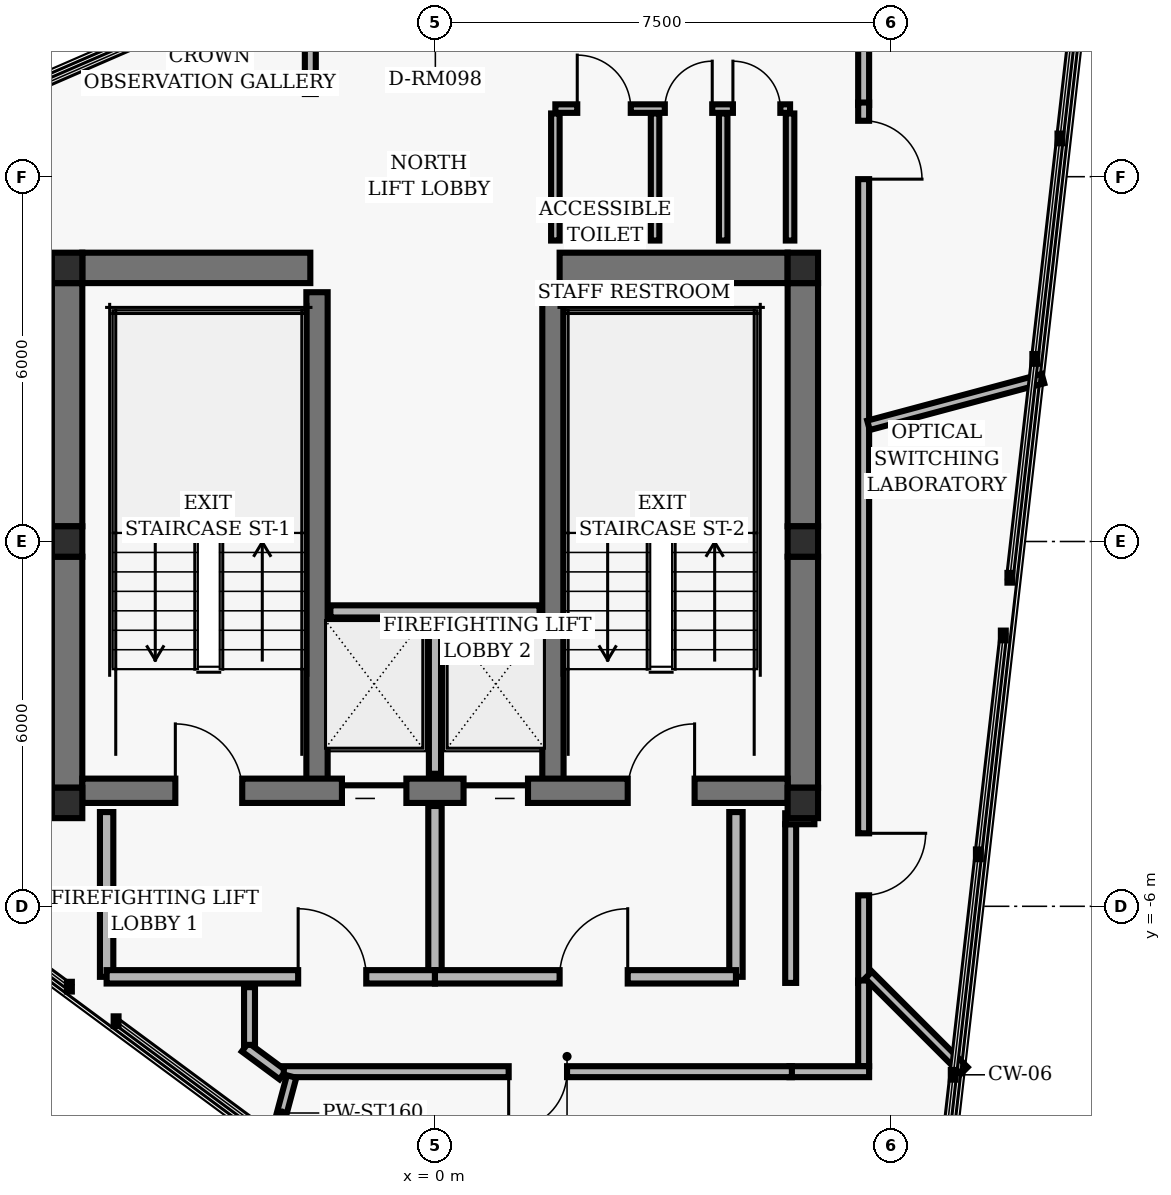
"""IFC4 building model, lengths in metres.
Left out: names, types, materials, properties, quantities, classifications, styles, units other than length and angle.
Written with IfcOpenShell. Run it as: python <this file> out.ifc"""

import sys

from ifc_helpers import new_model, si_unit, direction, frame, frame_2d, origin, origin_2d, place, context, subcontext, project, spatial, rectangle, hollow_rectangle, extrude, element, fill, save


model = new_model("IFC4")
c1 = context("Model", 3, precision=1e-05, world=origin(), true_north=direction((0.0, 1.0)))
c2 = subcontext(c1, "Body", "Model", "MODEL_VIEW")
j1 = project(units=[si_unit("LENGTHUNIT", "METRE"), si_unit("PLANEANGLEUNIT", "RADIAN")], contexts=[c1])
p1 = place(None, origin())
s1 = spatial("IfcSite", under=j1, at=p1, CompositionType="ELEMENT")
p2 = place(p1, origin())
s2 = spatial("IfcBuilding", under=s1, at=p2, CompositionType="ELEMENT")
p3 = place(p2, frame((0.0, 0.0, 243.36)))
s3 = spatial("IfcBuildingStorey", under=s2, at=p3, CompositionType="ELEMENT", Elevation=243.36)
for number, where, z_axis, x_axis in (
    (1, (-6.05, 4.5, 0.0), (0.0, 0.0, 1.0), (1.0, 0.0, 0.0)),
    (2, (6.05, 4.5, 0.0), (0.0, 0.0, 1.0), (1.0, 0.0, 0.0)),
    (3, (-6.05, 0.0, 0.0), (0.0, 0.0, 1.0), (1.0, 0.0, 0.0)),
    (4, (6.05, 0.0, 0.0), (0.0, 0.0, 1.0), (1.0, 0.0, 0.0)),
    (5, (-6.05, -4.3, 0.0), (0.0, 0.0, 1.0), (1.0, 0.0, 0.0)),
    (6, (6.05, -4.3, 0.0), (0.0, 0.0, 1.0), (1.0, 0.0, 0.0)),
):
    element("IfcColumn", number, at=place(p3, frame(where, z_axis=z_axis, x_axis=x_axis)), inside=s3, PredefinedType="COLUMN", context=c2, shape_type="SweptSolid", body=[
        extrude(hollow_rectangle(XDim=0.5, YDim=0.5, WallThickness=0.02, InnerFilletRadius=0.02, OuterFilletRadius=0.04, at=origin_2d()), origin(), (0.0, 0.0, 1.0), 2.88),
    ])
p4 = place(p3, frame((-6.05, 0.25, 0.0), z_axis=(0.0, 0.0, 1.0), x_axis=(0.0, 1.0, 0.0)))
e7 = element("IfcWall", 7, at=p4, inside=s3, PredefinedType="SHEAR", context=c2, shape_type="SweptSolid", body=[
    extrude(rectangle(XDim=4.0, YDim=0.5, at=frame_2d((2.0, 0.0))), origin(), (0.0, 0.0, 1.0), 2.648),
])
p5 = place(p3, frame((-6.05, -4.05, 0.0), z_axis=(0.0, 0.0, 1.0), x_axis=(0.0, 1.0, 0.0)))
e8 = element("IfcWall", 8, at=p5, inside=s3, PredefinedType="SHEAR", context=c2, shape_type="SweptSolid", body=[
    extrude(rectangle(XDim=3.8, YDim=0.5, at=frame_2d((1.9, 0.0))), origin(), (0.0, 0.0, 1.0), 2.648),
])
p6 = place(p3, frame((6.05, 0.25, 0.0), z_axis=(0.0, 0.0, 1.0), x_axis=(0.0, 1.0, 0.0)))
e9 = element("IfcWall", 9, at=p6, inside=s3, PredefinedType="SHEAR", context=c2, shape_type="SweptSolid", body=[
    extrude(rectangle(XDim=4.0, YDim=0.5, at=frame_2d((2.0, 0.0))), origin(), (0.0, 0.0, 1.0), 2.648),
])
p7 = place(p3, frame((6.05, -4.05, 0.0), z_axis=(0.0, 0.0, 1.0), x_axis=(0.0, 1.0, 0.0)))
e10 = element("IfcWall", 10, at=p7, inside=s3, PredefinedType="SHEAR", context=c2, shape_type="SweptSolid", body=[
    extrude(rectangle(XDim=3.8, YDim=0.5, at=frame_2d((1.9, 0.0))), origin(), (0.0, 0.0, 1.0), 2.648),
])
for number, where, z_axis, x_axis in (
    (11, (-1.94, -4.1, 0.0), (0.0, 0.0, 1.0), (0.0, 1.0, 0.0)),
    (12, (1.94, -4.1, 0.0), (0.0, 0.0, 1.0), (0.0, 1.0, 0.0)),
):
    element("IfcWall", number, at=place(p3, frame(where, z_axis=z_axis, x_axis=x_axis)), inside=s3, PredefinedType="SHEAR", context=c2, shape_type="SweptSolid", body=[
        extrude(rectangle(XDim=8.2, YDim=0.35, at=frame_2d((4.1, 0.0))), origin(), (0.0, 0.0, 1.0), 2.648),
    ])
p8 = place(p3, frame((-5.8, -4.1, 0.0), z_axis=(0.0, 0.0, 1.0), x_axis=(1.0, 0.0, 0.0)))
e13 = element("IfcWall", 13, at=p8, inside=s3, PredefinedType="SHEAR", context=c2, shape_type="SweptSolid", body=[
    extrude(rectangle(XDim=11.6, YDim=0.4, at=frame_2d((5.8, 0.0))), origin(), (0.0, 0.0, 1.0), 2.648),
])
p9 = place(p8, frame((1.53, 0.0, 0.0)))
e14 = element("IfcOpeningElement", 14, at=p9, cuts=e13, PredefinedType="OPENING", context=c2, shape_type="SweptSolid", body=[
    extrude(rectangle(XDim=1.1, YDim=2.04, at=frame_2d((0.55, 1.02))), frame((0.0, 0.21, 0.0), z_axis=(0.0, -1.0, 0.0), x_axis=(1.0, 0.0, 0.0)), (0.0, 0.0, 1.0), 0.42),
])
p10 = place(p8, frame((8.97, 0.0, 0.0)))
e15 = element("IfcOpeningElement", 15, at=p10, cuts=e13, PredefinedType="OPENING", context=c2, shape_type="SweptSolid", body=[
    extrude(rectangle(XDim=1.1, YDim=2.04, at=frame_2d((0.55, 1.02))), frame((0.0, 0.21, 0.0), z_axis=(0.0, -1.0, 0.0), x_axis=(1.0, 0.0, 0.0)), (0.0, 0.0, 1.0), 0.42),
])
p11 = place(p8, frame((4.27, 0.0, 0.0)))
e16 = element("IfcOpeningElement", 16, at=p11, cuts=e13, PredefinedType="OPENING", context=c2, shape_type="SweptSolid", body=[
    extrude(rectangle(XDim=1.06, YDim=2.04, at=frame_2d((0.53, 1.02))), frame((0.0, 0.21, 0.0), z_axis=(0.0, -1.0, 0.0), x_axis=(1.0, 0.0, 0.0)), (0.0, 0.0, 1.0), 0.42),
])
p12 = place(p8, frame((6.27, 0.0, 0.0)))
e17 = element("IfcOpeningElement", 17, at=p12, cuts=e13, PredefinedType="OPENING", context=c2, shape_type="SweptSolid", body=[
    extrude(rectangle(XDim=1.06, YDim=2.04, at=frame_2d((0.53, 1.02))), frame((0.0, 0.21, 0.0), z_axis=(0.0, -1.0, 0.0), x_axis=(1.0, 0.0, 0.0)), (0.0, 0.0, 1.0), 0.42),
])
for number, where, z_axis, x_axis in (
    (18, (-5.8, 4.5, 0.0), (0.0, 0.0, 1.0), (1.0, 0.0, 0.0)),
    (19, (2.05, 4.5, 0.0), (0.0, 0.0, 1.0), (1.0, 0.0, 0.0)),
):
    element("IfcWall", number, at=place(p3, frame(where, z_axis=z_axis, x_axis=x_axis)), inside=s3, PredefinedType="SHEAR", context=c2, shape_type="SweptSolid", body=[
        extrude(rectangle(XDim=3.75, YDim=0.5, at=frame_2d((1.875, 0.0))), origin(), (0.0, 0.0, 1.0), 2.648),
    ])
p13 = place(p3, frame((0.0, -3.82, 0.0), z_axis=(0.0, 0.0, 1.0), x_axis=(0.0, 1.0, 0.0)))
e20 = element("IfcWall", 20, at=p13, inside=s3, PredefinedType="PARTITIONING", context=c2, shape_type="SweptSolid", body=[
    extrude(rectangle(XDim=2.67, YDim=0.2, at=frame_2d((1.335, 0.0))), origin(), (0.0, 0.0, 1.0), 2.623),
])
p14 = place(p3, frame((-1.72, -1.15, 0.0), z_axis=(0.0, 0.0, 1.0), x_axis=(1.0, 0.0, 0.0)))
e21 = element("IfcWall", 21, at=p14, inside=s3, PredefinedType="PARTITIONING", context=c2, shape_type="SweptSolid", body=[
    extrude(rectangle(XDim=3.44, YDim=0.2, at=frame_2d((1.72, 0.0))), origin(), (0.0, 0.0, 1.0), 2.623),
])
for number, where, z_axis, x_axis in (
    (22, (-5.4, -7.16, 0.0), (0.0, 0.0, 1.0), (0.0, 1.0, 0.0)),
    (23, (4.95, -7.16, 0.0), (0.0, 0.0, 1.0), (0.0, 1.0, 0.0)),
):
    element("IfcWall", number, at=place(p3, frame(where, z_axis=z_axis, x_axis=x_axis)), inside=s3, PredefinedType="PARTITIONING", context=c2, shape_type="SweptSolid", body=[
        extrude(rectangle(XDim=2.71, YDim=0.22, at=frame_2d((1.355, 0.0))), origin(), (0.0, 0.0, 1.0), 2.623),
    ])
p15 = place(p3, frame((0.0, -7.16, 0.0), z_axis=(0.0, 0.0, 1.0), x_axis=(0.0, 1.0, 0.0)))
e24 = element("IfcWall", 24, at=p15, inside=s3, PredefinedType="PARTITIONING", context=c2, shape_type="SweptSolid", body=[
    extrude(rectangle(XDim=2.81, YDim=0.22, at=frame_2d((1.405, 0.0))), origin(), (0.0, 0.0, 1.0), 2.623),
])
p16 = place(p3, frame((-5.4, -7.16, 0.0), z_axis=(0.0, 0.0, 1.0), x_axis=(1.0, 0.0, 0.0)))
e25 = element("IfcWall", 25, at=p16, inside=s3, PredefinedType="PARTITIONING", context=c2, shape_type="SweptSolid", body=[
    extrude(rectangle(XDim=5.4, YDim=0.22, at=frame_2d((2.7, 0.0))), origin(), (0.0, 0.0, 1.0), 2.623),
])
p17 = place(p16, frame((3.15, 0.0, 0.0)))
e26 = element("IfcOpeningElement", 26, at=p17, cuts=e25, PredefinedType="OPENING", context=c2, shape_type="SweptSolid", body=[
    extrude(rectangle(XDim=1.12, YDim=2.02, at=frame_2d((0.56, 1.01))), frame((0.0, 0.12, 0.0), z_axis=(0.0, -1.0, 0.0), x_axis=(1.0, 0.0, 0.0)), (0.0, 0.0, 1.0), 0.24),
])
p18 = place(p3, frame((0.0, -7.16, 0.0), z_axis=(0.0, 0.0, 1.0), x_axis=(1.0, 0.0, 0.0)))
e27 = element("IfcWall", 27, at=p18, inside=s3, PredefinedType="PARTITIONING", context=c2, shape_type="SweptSolid", body=[
    extrude(rectangle(XDim=4.95, YDim=0.22, at=frame_2d((2.475, 0.0))), origin(), (0.0, 0.0, 1.0), 2.623),
])
p19 = place(p18, frame((2.05, 0.0, 0.0)))
e28 = element("IfcOpeningElement", 28, at=p19, cuts=e27, PredefinedType="OPENING", context=c2, shape_type="SweptSolid", body=[
    extrude(rectangle(XDim=1.12, YDim=2.02, at=frame_2d((0.56, 1.01))), frame((0.0, 0.12, 0.0), z_axis=(0.0, -1.0, 0.0), x_axis=(1.0, 0.0, 0.0)), (0.0, 0.0, 1.0), 0.24),
])
p20 = place(p3, frame((1.98, 4.95, 0.0), z_axis=(0.0, 0.0, 1.0), x_axis=(0.0, 1.0, 0.0)))
e29 = element("IfcWall", 29, at=p20, inside=s3, PredefinedType="PARTITIONING", context=c2, shape_type="SweptSolid", body=[
    extrude(rectangle(XDim=2.09, YDim=0.14, at=frame_2d((1.045, 0.0))), origin(), (0.0, 0.0, 1.0), 2.623),
])
p21 = place(p3, frame((5.84, 4.95, 0.0), z_axis=(0.0, 0.0, 1.0), x_axis=(0.0, 1.0, 0.0)))
e30 = element("IfcWall", 30, at=p21, inside=s3, PredefinedType="PARTITIONING", context=c2, shape_type="SweptSolid", body=[
    extrude(rectangle(XDim=2.09, YDim=0.14, at=frame_2d((1.045, 0.0))), origin(), (0.0, 0.0, 1.0), 2.153),
])
p22 = place(p3, frame((1.98, 7.12, 0.0), z_axis=(0.0, 0.0, 1.0), x_axis=(1.0, 0.0, 0.0)))
e31 = element("IfcWall", 31, at=p22, inside=s3, PredefinedType="PARTITIONING", context=c2, shape_type="SweptSolid", body=[
    extrude(rectangle(XDim=3.86, YDim=0.14, at=frame_2d((1.93, 0.0))), origin(), (0.0, 0.0, 1.0), 2.623),
])
p23 = place(p22, frame((0.36, 0.0, 0.0)))
e32 = element("IfcOpeningElement", 32, at=p23, cuts=e31, PredefinedType="OPENING", context=c2, shape_type="SweptSolid", body=[
    extrude(rectangle(XDim=0.88, YDim=2.02, at=frame_2d((0.44, 1.01))), frame((0.0, 0.08, 0.0), z_axis=(0.0, -1.0, 0.0), x_axis=(1.0, 0.0, 0.0)), (0.0, 0.0, 1.0), 0.16),
])
p24 = place(p22, frame((1.8, 0.0, 0.0)))
e33 = element("IfcOpeningElement", 33, at=p24, cuts=e31, PredefinedType="OPENING", context=c2, shape_type="SweptSolid", body=[
    extrude(rectangle(XDim=0.78, YDim=2.01, at=frame_2d((0.39, 1.005))), frame((0.0, 0.08, 0.0), z_axis=(0.0, -1.0, 0.0), x_axis=(1.0, 0.0, 0.0)), (0.0, 0.0, 1.0), 0.16),
])
p25 = place(p22, frame((2.92, 0.0, 0.0)))
e34 = element("IfcOpeningElement", 34, at=p25, cuts=e31, PredefinedType="OPENING", context=c2, shape_type="SweptSolid", body=[
    extrude(rectangle(XDim=0.78, YDim=2.01, at=frame_2d((0.39, 1.005))), frame((0.0, 0.08, 0.0), z_axis=(0.0, -1.0, 0.0), x_axis=(1.0, 0.0, 0.0)), (0.0, 0.0, 1.0), 0.16),
])
for number, where, z_axis, x_axis in (
    (35, (3.62, 4.95, 0.0), (0.0, 0.0, 1.0), (0.0, 1.0, 0.0)),
    (36, (4.74, 4.95, 0.0), (0.0, 0.0, 1.0), (0.0, 1.0, 0.0)),
):
    element("IfcWall", number, at=place(p3, frame(where, z_axis=z_axis, x_axis=x_axis)), inside=s3, PredefinedType="PARTITIONING", context=c2, shape_type="SweptSolid", body=[
        extrude(rectangle(XDim=2.09, YDim=0.14, at=frame_2d((1.045, 0.0))), origin(), (0.0, 0.0, 1.0), 2.623),
    ])
p26 = place(p3, frame((-2.503, -8.773, 0.0), z_axis=(0.0, 0.0, 1.0), x_axis=(-0.803978362095, 0.594658551845, 0.0)))
e37 = element("IfcWall", 37, at=p26, inside=s3, PredefinedType="PARTITIONING", context=c2, shape_type="SweptSolid", body=[
    extrude(rectangle(XDim=0.77, YDim=0.18, at=frame_2d((0.385, 0.0))), origin(), (0.0, 0.0, 1.0), 2.203),
])
p27 = place(p3, frame((-3.05, -8.279, 0.0), z_axis=(0.0, 0.0, 1.0), x_axis=(0.0, 1.0, 0.0)))
e38 = element("IfcWall", 38, at=p27, inside=s3, PredefinedType="PARTITIONING", context=c2, shape_type="SweptSolid", body=[
    extrude(rectangle(XDim=0.949, YDim=0.18, at=frame_2d((0.475, 0.0))), origin(), (0.0, 0.0, 1.0), 2.623),
])
p28 = place(p3, frame((5.85, -7.26, 0.0), z_axis=(0.0, 0.0, 1.0), x_axis=(0.0, 1.0, 0.0)))
e39 = element("IfcWall", 39, at=p28, inside=s3, PredefinedType="PARTITIONING", context=c2, shape_type="SweptSolid", body=[
    extrude(rectangle(XDim=2.61, YDim=0.18, at=frame_2d((1.305, 0.0))), origin(), (0.0, 0.0, 1.0), 2.153),
])
p29 = place(p3, frame((5.76, -4.56, 0.0), z_axis=(0.0, 0.0, 1.0), x_axis=(1.0, 0.0, 0.0)))
e40 = element("IfcWall", 40, at=p29, inside=s3, PredefinedType="PARTITIONING", context=c2, shape_type="SweptSolid", body=[
    extrude(rectangle(XDim=0.48, YDim=0.18, at=frame_2d((0.24, 0.0))), origin(), (0.0, 0.0, 1.0), 2.623),
])
p30 = place(p3, frame((-2.05, 7.36, 0.0), z_axis=(0.0, 0.0, 1.0), x_axis=(0.0, 1.0, 0.0)))
e41 = element("IfcWall", 41, at=p30, inside=s3, PredefinedType="PARTITIONING", context=c2, shape_type="SweptSolid", body=[
    extrude(rectangle(XDim=0.973, YDim=0.18, at=frame_2d((0.486, 0.0))), origin(), (0.0, 0.0, 1.0), 2.623),
])
p31 = place(p3, frame((7.05, 8.53, 0.0), z_axis=(0.0, 0.0, 1.0), x_axis=(0.0, -1.0, 0.0)))
e42 = element("IfcWall", 42, at=p31, inside=s3, PredefinedType="PARTITIONING", context=c2, shape_type="SweptSolid", body=[
    extrude(rectangle(XDim=1.35, YDim=0.18, at=frame_2d((0.675, 0.0))), origin(), (0.0, 0.0, 1.0), 2.623),
])
p32 = place(p3, frame((7.05, 7.22, 0.0), z_axis=(0.0, 0.0, 1.0), x_axis=(0.0, -1.0, 0.0)))
e43 = element("IfcWall", 43, at=p32, inside=s3, PredefinedType="PARTITIONING", context=c2, shape_type="SweptSolid", body=[
    extrude(rectangle(XDim=14.48, YDim=0.18, at=frame_2d((7.24, 0.0))), origin(), (0.0, 0.0, 1.0), 2.203),
])
p33 = place(p32, frame((12.019, 0.0, 0.0)))
e44 = element("IfcOpeningElement", 44, at=p33, cuts=e43, PredefinedType="OPENING", context=c2, shape_type="SweptSolid", body=[
    extrude(rectangle(XDim=1.02, YDim=2.02, at=frame_2d((0.51, 1.01))), frame((0.0, 0.1, 0.0), z_axis=(0.0, -1.0, 0.0), x_axis=(1.0, 0.0, 0.0)), (0.0, 0.0, 1.0), 0.2),
])
p34 = place(p32, frame((0.3, 0.0, 0.0)))
e45 = element("IfcOpeningElement", 45, at=p34, cuts=e43, PredefinedType="OPENING", context=c2, shape_type="SweptSolid", body=[
    extrude(rectangle(XDim=0.96, YDim=2.02, at=frame_2d((0.48, 1.01))), frame((0.0, 0.1, 0.0), z_axis=(0.0, -1.0, 0.0), x_axis=(1.0, 0.0, 0.0)), (0.0, 0.0, 1.0), 0.2),
])
p35 = place(p3, frame((7.05, -7.22, 0.0), z_axis=(0.0, 0.0, 1.0), x_axis=(0.0, -1.0, 0.0)))
e46 = element("IfcWall", 46, at=p35, inside=s3, PredefinedType="PARTITIONING", context=c2, shape_type="SweptSolid", body=[
    extrude(rectangle(XDim=1.41, YDim=0.18, at=frame_2d((0.705, 0.0))), origin(), (0.0, 0.0, 1.0), 2.153),
])
p36 = place(p3, frame((7.14, -8.72, 0.0), z_axis=(0.0, 0.0, 1.0), x_axis=(-1.0, 0.0, 0.0)))
e47 = element("IfcWall", 47, at=p36, inside=s3, PredefinedType="PARTITIONING", context=c2, shape_type="SweptSolid", body=[
    extrude(rectangle(XDim=1.31, YDim=0.18, at=frame_2d((0.655, 0.0))), origin(), (0.0, 0.0, 1.0), 2.623),
])
p37 = place(p3, frame((5.87, -8.72, 0.0), z_axis=(0.0, 0.0, 1.0), x_axis=(-1.0, 0.0, 0.0)))
e48 = element("IfcWall", 48, at=p37, inside=s3, PredefinedType="PARTITIONING", context=c2, shape_type="SweptSolid", body=[
    extrude(rectangle(XDim=8.356, YDim=0.18, at=frame_2d((4.178, 0.0))), origin(), (0.0, 0.0, 1.0), 2.623),
])
p38 = place(p37, frame((3.698, 0.0, 0.0)))
e49 = element("IfcOpeningElement", 49, at=p38, cuts=e48, PredefinedType="OPENING", context=c2, shape_type="SweptSolid", body=[
    extrude(rectangle(XDim=0.96, YDim=2.02, at=frame_2d((0.48, 1.01))), frame((0.0, 0.1, 0.0), z_axis=(0.0, -1.0, 0.0), x_axis=(1.0, 0.0, 0.0)), (0.0, 0.0, 1.0), 0.2),
])
p39 = place(p3, frame((-2.358, -8.8, 0.0), z_axis=(0.0, 0.0, 1.0), x_axis=(-0.258739361089, -0.965947174034, 0.0)))
e50 = element("IfcWall", 50, at=p39, inside=s3, PredefinedType="PARTITIONING", context=c2, shape_type="SweptSolid", body=[
    extrude(rectangle(XDim=1.242, YDim=0.16, at=frame_2d((0.621, 0.0))), origin(), (0.0, 0.0, 1.0), 2.623),
])
p40 = place(p3, frame((7.13, -7.13, 0.0), z_axis=(0.0, 0.0, 1.0), x_axis=(0.707106781187, -0.707106781187, 0.0)))
e51 = element("IfcWall", 51, at=p40, inside=s3, PredefinedType="PARTITIONING", context=c2, shape_type="SweptSolid", body=[
    extrude(rectangle(XDim=2.224, YDim=0.16, at=frame_2d((1.112, 0.0))), origin(), (0.0, 0.0, 1.0), 2.623),
])
p41 = place(p3, frame((7.13, 1.91, 0.0), z_axis=(0.0, 0.0, 1.0), x_axis=(0.965935580448, 0.258782639342, 0.0)))
e52 = element("IfcWall", 52, at=p41, inside=s3, PredefinedType="PARTITIONING", context=c2, shape_type="SweptSolid", body=[
    extrude(rectangle(XDim=2.971, YDim=0.16, at=frame_2d((1.485, 0.0))), origin(), (0.0, 0.0, 1.0), 2.623),
])
p42 = place(p9, origin())
e53 = element("IfcDoor", 53, at=p42, inside=s3, OperationType="SINGLE_SWING_LEFT", PredefinedType="DOOR", context=c2, shape_type="SweptSolid", body=[
    extrude(rectangle(XDim=1.1, YDim=2.04, at=frame_2d((0.55, 1.02))), frame((0.0, 0.025, 0.0), z_axis=(0.0, -1.0, 0.0), x_axis=(1.0, 0.0, 0.0)), (0.0, 0.0, 1.0), 0.05),
])
fill(e14, e53)
p43 = place(p10, origin())
e54 = element("IfcDoor", 54, at=p43, inside=s3, OperationType="SINGLE_SWING_RIGHT", PredefinedType="DOOR", context=c2, shape_type="SweptSolid", body=[
    extrude(rectangle(XDim=1.1, YDim=2.04, at=frame_2d((0.55, 1.02))), frame((0.0, 0.025, 0.0), z_axis=(0.0, -1.0, 0.0), x_axis=(1.0, 0.0, 0.0)), (0.0, 0.0, 1.0), 0.05),
])
fill(e15, e54)
p44 = place(p11, origin())
e55 = element("IfcDoor", 55, at=p44, inside=s3, OperationType="SLIDING_TO_LEFT", PredefinedType="DOOR", context=c2, shape_type="SweptSolid", body=[
    extrude(rectangle(XDim=1.06, YDim=2.04, at=frame_2d((0.53, 1.02))), frame((0.0, 0.025, 0.0), z_axis=(0.0, -1.0, 0.0), x_axis=(1.0, 0.0, 0.0)), (0.0, 0.0, 1.0), 0.05),
])
fill(e16, e55)
p45 = place(p12, origin())
e56 = element("IfcDoor", 56, at=p45, inside=s3, OperationType="SLIDING_TO_RIGHT", PredefinedType="DOOR", context=c2, shape_type="SweptSolid", body=[
    extrude(rectangle(XDim=1.06, YDim=2.04, at=frame_2d((0.53, 1.02))), frame((0.0, 0.025, 0.0), z_axis=(0.0, -1.0, 0.0), x_axis=(1.0, 0.0, 0.0)), (0.0, 0.0, 1.0), 0.05),
])
fill(e17, e56)
p46 = place(p17, origin())
e57 = element("IfcDoor", 57, at=p46, inside=s3, OperationType="SINGLE_SWING_LEFT", PredefinedType="DOOR", context=c2, shape_type="SweptSolid", body=[
    extrude(rectangle(XDim=1.12, YDim=2.02, at=frame_2d((0.56, 1.01))), frame((0.0, 0.025, 0.0), z_axis=(0.0, -1.0, 0.0), x_axis=(1.0, 0.0, 0.0)), (0.0, 0.0, 1.0), 0.05),
])
fill(e26, e57)
p47 = place(p19, origin())
e58 = element("IfcDoor", 58, at=p47, inside=s3, OperationType="SINGLE_SWING_RIGHT", PredefinedType="DOOR", context=c2, shape_type="SweptSolid", body=[
    extrude(rectangle(XDim=1.12, YDim=2.02, at=frame_2d((0.56, 1.01))), frame((0.0, 0.025, 0.0), z_axis=(0.0, -1.0, 0.0), x_axis=(1.0, 0.0, 0.0)), (0.0, 0.0, 1.0), 0.05),
])
fill(e28, e58)
p48 = place(p23, origin())
e59 = element("IfcDoor", 59, at=p48, inside=s3, OperationType="SINGLE_SWING_LEFT", PredefinedType="DOOR", context=c2, shape_type="SweptSolid", body=[
    extrude(rectangle(XDim=0.88, YDim=2.02, at=frame_2d((0.44, 1.01))), frame((0.0, 0.025, 0.0), z_axis=(0.0, -1.0, 0.0), x_axis=(1.0, 0.0, 0.0)), (0.0, 0.0, 1.0), 0.05),
])
fill(e32, e59)
p49 = place(p24, origin())
e60 = element("IfcDoor", 60, at=p49, inside=s3, OperationType="SINGLE_SWING_RIGHT", PredefinedType="DOOR", context=c2, shape_type="SweptSolid", body=[
    extrude(rectangle(XDim=0.78, YDim=2.01, at=frame_2d((0.39, 1.005))), frame((0.0, 0.025, 0.0), z_axis=(0.0, -1.0, 0.0), x_axis=(1.0, 0.0, 0.0)), (0.0, 0.0, 1.0), 0.05),
])
fill(e33, e60)
p50 = place(p25, origin())
e61 = element("IfcDoor", 61, at=p50, inside=s3, OperationType="SINGLE_SWING_LEFT", PredefinedType="DOOR", context=c2, shape_type="SweptSolid", body=[
    extrude(rectangle(XDim=0.78, YDim=2.01, at=frame_2d((0.39, 1.005))), frame((0.0, 0.025, 0.0), z_axis=(0.0, -1.0, 0.0), x_axis=(1.0, 0.0, 0.0)), (0.0, 0.0, 1.0), 0.05),
])
fill(e34, e61)
p51 = place(p38, origin())
e62 = element("IfcDoor", 62, at=p51, inside=s3, OperationType="SINGLE_SWING_RIGHT", PredefinedType="DOOR", context=c2, shape_type="SweptSolid", body=[
    extrude(rectangle(XDim=0.96, YDim=2.02, at=frame_2d((0.48, 1.01))), frame((0.0, 0.025, 0.0), z_axis=(0.0, -1.0, 0.0), x_axis=(1.0, 0.0, 0.0)), (0.0, 0.0, 1.0), 0.05),
])
fill(e49, e62)
p52 = place(p33, origin())
e63 = element("IfcDoor", 63, at=p52, inside=s3, OperationType="SINGLE_SWING_LEFT", PredefinedType="DOOR", context=c2, shape_type="SweptSolid", body=[
    extrude(rectangle(XDim=1.02, YDim=2.02, at=frame_2d((0.51, 1.01))), frame((0.0, 0.025, 0.0), z_axis=(0.0, -1.0, 0.0), x_axis=(1.0, 0.0, 0.0)), (0.0, 0.0, 1.0), 0.05),
])
fill(e44, e63)
p53 = place(p34, origin())
e64 = element("IfcDoor", 64, at=p53, inside=s3, OperationType="SINGLE_SWING_RIGHT", PredefinedType="DOOR", context=c2, shape_type="SweptSolid", body=[
    extrude(rectangle(XDim=0.96, YDim=2.02, at=frame_2d((0.48, 1.01))), frame((0.0, 0.025, 0.0), z_axis=(0.0, -1.0, 0.0), x_axis=(1.0, 0.0, 0.0)), (0.0, 0.0, 1.0), 0.05),
])
fill(e45, e64)
save(model, sys.argv[1])
